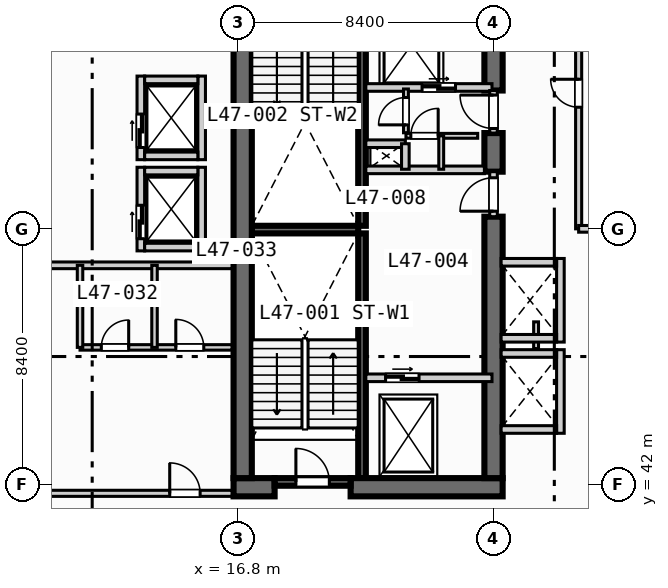
"""IFC4 building model, lengths in metres.
Left out: names, types, materials, properties, quantities, classifications, styles, units other than length and angle.
Written with IfcOpenShell. Run it as: python <this file> out.ifc"""

import sys

from ifc_helpers import new_model, si_unit, direction, frame, frame_2d, origin, place, context, subcontext, project, spatial, rectangle, extrude, element, fill, save


model = new_model("IFC4")
c1 = context("Model", 3, precision=1e-05, world=origin(), true_north=direction((0.0, 1.0)))
c2 = subcontext(c1, "Body", "Model", "MODEL_VIEW")
j1 = project(units=[si_unit("LENGTHUNIT", "METRE"), si_unit("PLANEANGLEUNIT", "RADIAN")], contexts=[c1])
p1 = place(None, origin())
s1 = spatial("IfcSite", under=j1, at=p1, CompositionType="ELEMENT")
p2 = place(p1, origin())
s2 = spatial("IfcBuilding", under=s1, at=p2, CompositionType="ELEMENT")
p3 = place(p2, frame((0.0, 0.0, 193.9)))
s3 = spatial("IfcBuildingStorey", under=s2, at=p3, CompositionType="ELEMENT", Elevation=193.9)
for number, where, z_axis, x_axis in (
    (1, (20.875, 42.2, 0.0), (0.0, 0.0, 1.0), (0.0, 1.0, 0.0)),
    (2, (20.875, 50.5, 0.0), (0.0, 0.0, 1.0), (0.0, 1.0, 0.0)),
):
    element("IfcWall", number, at=place(p3, frame(where, z_axis=z_axis, x_axis=x_axis)), inside=s3, PredefinedType="SOLIDWALL", context=c2, shape_type="SweptSolid", body=[
        extrude(rectangle(XDim=8.05, YDim=0.25, at=frame_2d((4.025, 0.0))), origin(), (0.0, 0.0, 1.0), 3.47),
    ])
p4 = place(p3, frame((17.25, 50.375, 0.0), z_axis=(0.0, 0.0, 1.0), x_axis=(1.0, 0.0, 0.0)))
e3 = element("IfcWall", 3, at=p4, inside=s3, PredefinedType="SOLIDWALL", context=c2, shape_type="SweptSolid", body=[
    extrude(rectangle(XDim=3.5, YDim=0.25, at=frame_2d((1.75, 0.0))), origin(), (0.0, 0.0, 1.0), 3.47),
])
p5 = place(p3, frame((16.65, 41.9, 0.0), z_axis=(0.0, 0.0, 1.0), x_axis=(1.0, 0.0, 0.0)))
e4 = element("IfcWall", 4, at=p5, inside=s3, PredefinedType="SHEAR", context=c2, shape_type="SweptSolid", body=[
    extrude(rectangle(XDim=1.35, YDim=0.6, at=frame_2d((0.675, 0.0))), origin(), (0.0, 0.0, 1.0), 3.47),
])
p6 = place(p3, frame((20.5, 41.9, 0.0), z_axis=(0.0, 0.0, 1.0), x_axis=(1.0, 0.0, 0.0)))
e5 = element("IfcWall", 5, at=p6, inside=s3, PredefinedType="SHEAR", context=c2, shape_type="SweptSolid", body=[
    extrude(rectangle(XDim=5.0, YDim=0.6, at=frame_2d((2.5, 0.0))), origin(), (0.0, 0.0, 1.0), 3.47),
])
p7 = place(p3, frame((16.95, 42.2, 0.0), z_axis=(0.0, 0.0, 1.0), x_axis=(0.0, 1.0, 0.0)))
e6 = element("IfcWall", 6, at=p7, inside=s3, PredefinedType="SHEAR", context=c2, shape_type="SweptSolid", body=[
    extrude(rectangle(XDim=16.35, YDim=0.6, at=frame_2d((8.175, 0.0))), origin(), (0.0, 0.0, 1.0), 3.47),
])
p8 = place(p3, frame((25.2, 42.2, 0.0), z_axis=(0.0, 0.0, 1.0), x_axis=(0.0, 1.0, 0.0)))
e7 = element("IfcWall", 7, at=p8, inside=s3, PredefinedType="SHEAR", context=c2, shape_type="SweptSolid", body=[
    extrude(rectangle(XDim=8.6, YDim=0.6, at=frame_2d((4.3, 0.0))), origin(), (0.0, 0.0, 1.0), 3.47),
])
p9 = place(p3, frame((25.2, 52.28, 0.0), z_axis=(0.0, 0.0, 1.0), x_axis=(0.0, 1.0, 0.0)))
e8 = element("IfcWall", 8, at=p9, inside=s3, PredefinedType="SHEAR", context=c2, shape_type="SweptSolid", body=[
    extrude(rectangle(XDim=1.27, YDim=0.6, at=frame_2d((0.635, 0.0))), origin(), (0.0, 0.0, 1.0), 3.47),
])
p10 = place(p3, frame((25.2, 54.95, 0.0), z_axis=(0.0, 0.0, 1.0), x_axis=(0.0, 1.0, 0.0)))
e9 = element("IfcWall", 9, at=p10, inside=s3, PredefinedType="SHEAR", context=c2, shape_type="SweptSolid", body=[
    extrude(rectangle(XDim=3.6, YDim=0.6, at=frame_2d((1.8, 0.0))), origin(), (0.0, 0.0, 1.0), 3.47),
])
p11 = place(p3, frame((18.0, 42.075, 0.0), z_axis=(0.0, 0.0, 1.0), x_axis=(1.0, 0.0, 0.0)))
e10 = element("IfcWall", 10, at=p11, inside=s3, PredefinedType="SOLIDWALL", context=c2, shape_type="SweptSolid", body=[
    extrude(rectangle(XDim=2.5, YDim=0.25, at=frame_2d((1.25, 0.0))), origin(), (0.0, 0.0, 1.0), 3.47),
])
p12 = place(p11, frame((0.7, 0.0, 0.0)))
e11 = element("IfcOpeningElement", 11, at=p12, cuts=e10, PredefinedType="OPENING", context=c2, shape_type="SweptSolid", body=[
    extrude(rectangle(XDim=1.1, YDim=2.15, at=frame_2d((0.55, 1.075))), frame((0.0, 0.135, 0.0), z_axis=(0.0, -1.0, 0.0), x_axis=(1.0, 0.0, 0.0)), (0.0, 0.0, 1.0), 0.27),
])
p13 = place(p3, frame((21.0, 45.5, 0.0), z_axis=(0.0, 0.0, 1.0), x_axis=(1.0, 0.0, 0.0)))
e12 = element("IfcWall", 12, at=p13, inside=s3, PredefinedType="SOLIDWALL", context=c2, shape_type="SweptSolid", body=[
    extrude(rectangle(XDim=4.15, YDim=0.25, at=frame_2d((2.075, 0.0))), origin(), (0.0, 0.0, 1.0), 3.47),
])
p14 = place(p13, frame((0.65, 0.0, 0.0)))
e13 = element("IfcOpeningElement", 13, at=p14, cuts=e12, PredefinedType="OPENING", context=c2, shape_type="SweptSolid", body=[
    extrude(rectangle(XDim=1.1, YDim=2.15, at=frame_2d((0.55, 1.075))), frame((0.0, 0.135, 0.0), z_axis=(0.0, -1.0, 0.0), x_axis=(1.0, 0.0, 0.0)), (0.0, 0.0, 1.0), 0.27),
])
p15 = place(p3, frame((25.2, 50.8, 0.0), z_axis=(0.0, 0.0, 1.0), x_axis=(0.0, 1.0, 0.0)))
e14 = element("IfcWall", 14, at=p15, inside=s3, PredefinedType="SOLIDWALL", context=c2, shape_type="SweptSolid", body=[
    extrude(rectangle(XDim=1.48, YDim=0.25, at=frame_2d((0.74, 0.0))), origin(), (0.0, 0.0, 1.0), 3.47),
])
p16 = place(p15, frame((0.18, 0.0, 0.0)))
e15 = element("IfcOpeningElement", 15, at=p16, cuts=e14, PredefinedType="OPENING", context=c2, shape_type="SweptSolid", body=[
    extrude(rectangle(XDim=1.1, YDim=2.15, at=frame_2d((0.55, 1.075))), frame((0.0, 0.135, 0.0), z_axis=(0.0, -1.0, 0.0), x_axis=(1.0, 0.0, 0.0)), (0.0, 0.0, 1.0), 0.27),
])
p17 = place(p3, frame((21.0, 52.34, 0.0), z_axis=(0.0, 0.0, 1.0), x_axis=(1.0, 0.0, 0.0)))
e16 = element("IfcWall", 16, at=p17, inside=s3, PredefinedType="SOLIDWALL", context=c2, shape_type="SweptSolid", body=[
    extrude(rectangle(XDim=3.9, YDim=0.25, at=frame_2d((1.95, 0.0))), origin(), (0.0, 0.0, 1.0), 3.47),
])
p18 = place(p3, frame((21.0, 55.05, 0.0), z_axis=(0.0, 0.0, 1.0), x_axis=(1.0, 0.0, 0.0)))
e17 = element("IfcWall", 17, at=p18, inside=s3, PredefinedType="SOLIDWALL", context=c2, shape_type="SweptSolid", body=[
    extrude(rectangle(XDim=4.15, YDim=0.25, at=frame_2d((2.075, 0.0))), origin(), (0.0, 0.0, 1.0), 3.47),
])
p19 = place(p18, frame((1.85, 0.0, 0.0)))
e18 = element("IfcOpeningElement", 18, at=p19, cuts=e17, PredefinedType="OPENING", context=c2, shape_type="SweptSolid", body=[
    extrude(rectangle(XDim=1.1, YDim=2.15, at=frame_2d((0.55, 1.075))), frame((0.0, 0.135, 0.0), z_axis=(0.0, -1.0, 0.0), x_axis=(1.0, 0.0, 0.0)), (0.0, 0.0, 1.0), 0.27),
])
p20 = place(p3, frame((25.2, 53.55, 0.0), z_axis=(0.0, 0.0, 1.0), x_axis=(0.0, 1.0, 0.0)))
e19 = element("IfcWall", 19, at=p20, inside=s3, PredefinedType="SOLIDWALL", context=c2, shape_type="SweptSolid", body=[
    extrude(rectangle(XDim=1.4, YDim=0.25, at=frame_2d((0.7, 0.0))), origin(), (0.0, 0.0, 1.0), 3.47),
])
p21 = place(p20, frame((0.15, 0.0, 0.0)))
e20 = element("IfcOpeningElement", 20, at=p21, cuts=e19, PredefinedType="OPENING", context=c2, shape_type="SweptSolid", body=[
    extrude(rectangle(XDim=1.1, YDim=2.15, at=frame_2d((0.55, 1.075))), frame((0.0, 0.135, 0.0), z_axis=(0.0, -1.0, 0.0), x_axis=(1.0, 0.0, 0.0)), (0.0, 0.0, 1.0), 0.27),
])
p22 = place(p3, frame((21.0, 53.2, 0.0), z_axis=(0.0, 0.0, 1.0), x_axis=(1.0, 0.0, 0.0)))
e21 = element("IfcWall", 21, at=p22, inside=s3, PredefinedType="SOLIDWALL", context=c2, shape_type="SweptSolid", body=[
    extrude(rectangle(XDim=1.3, YDim=0.25, at=frame_2d((0.65, 0.0))), origin(), (0.0, 0.0, 1.0), 3.47),
])
p23 = place(p3, frame((22.3, 52.36, 0.0), z_axis=(0.0, 0.0, 1.0), x_axis=(0.0, 1.0, 0.0)))
e22 = element("IfcWall", 22, at=p23, inside=s3, PredefinedType="SOLIDWALL", context=c2, shape_type="SweptSolid", body=[
    extrude(rectangle(XDim=0.84, YDim=0.25, at=frame_2d((0.42, 0.0))), origin(), (0.0, 0.0, 1.0), 3.47),
])
p24 = place(p3, frame((22.32, 53.56, 0.0), z_axis=(0.0, 0.0, 1.0), x_axis=(0.0, 1.0, 0.0)))
e23 = element("IfcWall", 23, at=p24, inside=s3, PredefinedType="PARTITIONING", context=c2, shape_type="SweptSolid", body=[
    extrude(rectangle(XDim=1.44, YDim=0.16, at=frame_2d((0.72, 0.0))), origin(), (0.0, 0.0, 1.0), 3.47),
])
p25 = place(p24, frame((0.26, 0.0, 0.0)))
e24 = element("IfcOpeningElement", 24, at=p25, cuts=e23, PredefinedType="OPENING", context=c2, shape_type="SweptSolid", body=[
    extrude(rectangle(XDim=0.9, YDim=2.1, at=frame_2d((0.45, 1.05))), frame((0.0, 0.09, 0.0), z_axis=(0.0, -1.0, 0.0), x_axis=(1.0, 0.0, 0.0)), (0.0, 0.0, 1.0), 0.18),
])
p26 = place(p3, frame((22.32, 53.46, 0.0), z_axis=(0.0, 0.0, 1.0), x_axis=(1.0, 0.0, 0.0)))
e25 = element("IfcWall", 25, at=p26, inside=s3, PredefinedType="PARTITIONING", context=c2, shape_type="SweptSolid", body=[
    extrude(rectangle(XDim=2.36, YDim=0.16, at=frame_2d((1.18, 0.0))), origin(), (0.0, 0.0, 1.0), 3.47),
])
p27 = place(p26, frame((0.16, 0.0, 0.0)))
e26 = element("IfcOpeningElement", 26, at=p27, cuts=e25, PredefinedType="OPENING", context=c2, shape_type="SweptSolid", body=[
    extrude(rectangle(XDim=0.9, YDim=2.1, at=frame_2d((0.45, 1.05))), frame((0.0, 0.09, 0.0), z_axis=(0.0, -1.0, 0.0), x_axis=(1.0, 0.0, 0.0)), (0.0, 0.0, 1.0), 0.18),
])
p28 = place(p3, frame((23.48, 52.36, 0.0), z_axis=(0.0, 0.0, 1.0), x_axis=(0.0, 1.0, 0.0)))
e27 = element("IfcWall", 27, at=p28, inside=s3, PredefinedType="PARTITIONING", context=c2, shape_type="SweptSolid", body=[
    extrude(rectangle(XDim=1.1, YDim=0.16, at=frame_2d((0.55, 0.0))), origin(), (0.0, 0.0, 1.0), 3.47),
])
p29 = place(p3, frame((13.6, 49.675, 0.0), z_axis=(0.0, 0.0, 1.0), x_axis=(0.0, 1.0, 0.0)))
e28 = element("IfcWall", 28, at=p29, inside=s3, PredefinedType="SOLIDWALL", context=c2, shape_type="SweptSolid", body=[
    extrude(rectangle(XDim=2.75, YDim=0.25, at=frame_2d((1.375, 0.0))), origin(), (0.0, 0.0, 1.0), 3.47),
])
p30 = place(p29, frame((0.4, 0.0, 0.0)))
e29 = element("IfcOpeningElement", 29, at=p30, cuts=e28, PredefinedType="OPENING", context=c2, shape_type="SweptSolid", body=[
    extrude(rectangle(XDim=1.1, YDim=2.15, at=frame_2d((0.55, 1.075))), frame((0.0, 0.135, 0.0), z_axis=(0.0, -1.0, 0.0), x_axis=(1.0, 0.0, 0.0)), (0.0, 0.0, 1.0), 0.27),
])
p31 = place(p3, frame((15.6, 49.675, 0.0), z_axis=(0.0, 0.0, 1.0), x_axis=(0.0, 1.0, 0.0)))
e30 = element("IfcWall", 30, at=p31, inside=s3, PredefinedType="SOLIDWALL", context=c2, shape_type="SweptSolid", body=[
    extrude(rectangle(XDim=2.75, YDim=0.25, at=frame_2d((1.375, 0.0))), origin(), (0.0, 0.0, 1.0), 3.47),
])
for number, where, z_axis, x_axis in (
    (31, (13.725, 49.8, 0.0), (0.0, 0.0, 1.0), (1.0, 0.0, 0.0)),
    (32, (13.725, 52.3, 0.0), (0.0, 0.0, 1.0), (1.0, 0.0, 0.0)),
):
    element("IfcWall", number, at=place(p3, frame(where, z_axis=z_axis, x_axis=x_axis)), inside=s3, PredefinedType="SOLIDWALL", context=c2, shape_type="SweptSolid", body=[
        extrude(rectangle(XDim=1.75, YDim=0.25, at=frame_2d((0.875, 0.0))), origin(), (0.0, 0.0, 1.0), 3.47),
    ])
p32 = place(p3, frame((13.6, 52.675, 0.0), z_axis=(0.0, 0.0, 1.0), x_axis=(0.0, 1.0, 0.0)))
e33 = element("IfcWall", 33, at=p32, inside=s3, PredefinedType="SOLIDWALL", context=c2, shape_type="SweptSolid", body=[
    extrude(rectangle(XDim=2.75, YDim=0.25, at=frame_2d((1.375, 0.0))), origin(), (0.0, 0.0, 1.0), 3.47),
])
p33 = place(p32, frame((0.4, 0.0, 0.0)))
e34 = element("IfcOpeningElement", 34, at=p33, cuts=e33, PredefinedType="OPENING", context=c2, shape_type="SweptSolid", body=[
    extrude(rectangle(XDim=1.1, YDim=2.15, at=frame_2d((0.55, 1.075))), frame((0.0, 0.135, 0.0), z_axis=(0.0, -1.0, 0.0), x_axis=(1.0, 0.0, 0.0)), (0.0, 0.0, 1.0), 0.27),
])
p34 = place(p3, frame((15.6, 52.675, 0.0), z_axis=(0.0, 0.0, 1.0), x_axis=(0.0, 1.0, 0.0)))
e35 = element("IfcWall", 35, at=p34, inside=s3, PredefinedType="SOLIDWALL", context=c2, shape_type="SweptSolid", body=[
    extrude(rectangle(XDim=2.75, YDim=0.25, at=frame_2d((1.375, 0.0))), origin(), (0.0, 0.0, 1.0), 3.47),
])
for number, where, z_axis, x_axis in (
    (36, (13.725, 52.8, 0.0), (0.0, 0.0, 1.0), (1.0, 0.0, 0.0)),
    (37, (13.725, 55.3, 0.0), (0.0, 0.0, 1.0), (1.0, 0.0, 0.0)),
):
    element("IfcWall", number, at=place(p3, frame(where, z_axis=z_axis, x_axis=x_axis)), inside=s3, PredefinedType="SOLIDWALL", context=c2, shape_type="SweptSolid", body=[
        extrude(rectangle(XDim=1.75, YDim=0.25, at=frame_2d((0.875, 0.0))), origin(), (0.0, 0.0, 1.0), 3.47),
    ])
p35 = place(p3, frame((27.4, 43.675, 0.0), z_axis=(0.0, 0.0, 1.0), x_axis=(0.0, 1.0, 0.0)))
e38 = element("IfcWall", 38, at=p35, inside=s3, PredefinedType="SOLIDWALL", context=c2, shape_type="SweptSolid", body=[
    extrude(rectangle(XDim=2.75, YDim=0.25, at=frame_2d((1.375, 0.0))), origin(), (0.0, 0.0, 1.0), 3.47),
])
for number, where, z_axis, x_axis in (
    (39, (25.45, 43.8, 0.0), (0.0, 0.0, 1.0), (1.0, 0.0, 0.0)),
    (40, (25.45, 46.3, 0.0), (0.0, 0.0, 1.0), (1.0, 0.0, 0.0)),
):
    element("IfcWall", number, at=place(p3, frame(where, z_axis=z_axis, x_axis=x_axis)), inside=s3, PredefinedType="SOLIDWALL", context=c2, shape_type="SweptSolid", body=[
        extrude(rectangle(XDim=1.825, YDim=0.25, at=frame_2d((0.913, 0.0))), origin(), (0.0, 0.0, 1.0), 3.47),
    ])
p36 = place(p3, frame((26.6, 46.46, 0.0), z_axis=(0.0, 0.0, 1.0), x_axis=(0.0, 1.0, 0.0)))
e41 = element("IfcWall", 41, at=p36, inside=s3, PredefinedType="PARTITIONING", context=c2, shape_type="SweptSolid", body=[
    extrude(rectangle(XDim=0.88, YDim=0.16, at=frame_2d((0.44, 0.0))), origin(), (0.0, 0.0, 1.0), 3.47),
])
p37 = place(p3, frame((27.4, 46.675, 0.0), z_axis=(0.0, 0.0, 1.0), x_axis=(0.0, 1.0, 0.0)))
e42 = element("IfcWall", 42, at=p37, inside=s3, PredefinedType="SOLIDWALL", context=c2, shape_type="SweptSolid", body=[
    extrude(rectangle(XDim=2.75, YDim=0.25, at=frame_2d((1.375, 0.0))), origin(), (0.0, 0.0, 1.0), 3.47),
])
for number, where, z_axis, x_axis in (
    (43, (25.45, 46.8, 0.0), (0.0, 0.0, 1.0), (1.0, 0.0, 0.0)),
    (44, (25.45, 49.3, 0.0), (0.0, 0.0, 1.0), (1.0, 0.0, 0.0)),
):
    element("IfcWall", number, at=place(p3, frame(where, z_axis=z_axis, x_axis=x_axis)), inside=s3, PredefinedType="SOLIDWALL", context=c2, shape_type="SweptSolid", body=[
        extrude(rectangle(XDim=1.825, YDim=0.25, at=frame_2d((0.913, 0.0))), origin(), (0.0, 0.0, 1.0), 3.47),
    ])
p38 = place(p3, frame((0.35, 41.7, 0.0), z_axis=(0.0, 0.0, 1.0), x_axis=(1.0, 0.0, 0.0)))
e45 = element("IfcWall", 45, at=p38, inside=s3, PredefinedType="PARTITIONING", context=c2, shape_type="SweptSolid", body=[
    extrude(rectangle(XDim=16.25, YDim=0.2, at=frame_2d((8.125, 0.0))), origin(), (0.0, 0.0, 1.0), 2.82),
])
p39 = place(p38, frame((14.2, 0.0, 0.0)))
e46 = element("IfcOpeningElement", 46, at=p39, cuts=e45, PredefinedType="OPENING", context=c2, shape_type="SweptSolid", body=[
    extrude(rectangle(XDim=1.0, YDim=2.15, at=frame_2d((0.5, 1.075))), frame((0.0, 0.11, 0.0), z_axis=(0.0, -1.0, 0.0), x_axis=(1.0, 0.0, 0.0)), (0.0, 0.0, 1.0), 0.22),
])
p40 = place(p3, frame((0.35, 49.2, 0.0), z_axis=(0.0, 0.0, 1.0), x_axis=(1.0, 0.0, 0.0)))
e47 = element("IfcWall", 47, at=p40, inside=s3, PredefinedType="PARTITIONING", context=c2, shape_type="SweptSolid", body=[
    extrude(rectangle(XDim=16.25, YDim=0.22, at=frame_2d((8.125, 0.0))), origin(), (0.0, 0.0, 1.0), 3.47),
])
p41 = place(p3, frame((11.6, 46.5, 0.0), z_axis=(0.0, 0.0, 1.0), x_axis=(1.0, 0.0, 0.0)))
e48 = element("IfcWall", 48, at=p41, inside=s3, PredefinedType="PLUMBINGWALL", context=c2, shape_type="SweptSolid", body=[
    extrude(rectangle(XDim=5.0, YDim=0.18, at=frame_2d((2.5, 0.0))), origin(), (0.0, 0.0, 1.0), 3.47),
])
p42 = place(p41, frame((0.7, 0.0, 0.0)))
e49 = element("IfcOpeningElement", 49, at=p42, cuts=e48, PredefinedType="OPENING", context=c2, shape_type="SweptSolid", body=[
    extrude(rectangle(XDim=0.9, YDim=2.1, at=frame_2d((0.45, 1.05))), frame((0.0, 0.1, 0.0), z_axis=(0.0, -1.0, 0.0), x_axis=(1.0, 0.0, 0.0)), (0.0, 0.0, 1.0), 0.2),
])
p43 = place(p41, frame((3.15, 0.0, 0.0)))
e50 = element("IfcOpeningElement", 50, at=p43, cuts=e48, PredefinedType="OPENING", context=c2, shape_type="SweptSolid", body=[
    extrude(rectangle(XDim=0.92, YDim=2.1, at=frame_2d((0.46, 1.05))), frame((0.0, 0.1, 0.0), z_axis=(0.0, -1.0, 0.0), x_axis=(1.0, 0.0, 0.0)), (0.0, 0.0, 1.0), 0.2),
])
for number, where, z_axis, x_axis in (
    (51, (11.6, 46.5, 0.0), (0.0, 0.0, 1.0), (0.0, 1.0, 0.0)),
    (52, (14.05, 46.5, 0.0), (0.0, 0.0, 1.0), (0.0, 1.0, 0.0)),
):
    element("IfcWall", number, at=place(p3, frame(where, z_axis=z_axis, x_axis=x_axis)), inside=s3, PredefinedType="PLUMBINGWALL", context=c2, shape_type="SweptSolid", body=[
        extrude(rectangle(XDim=2.7, YDim=0.18, at=frame_2d((1.35, 0.0))), origin(), (0.0, 0.0, 1.0), 3.47),
    ])
p44 = place(p3, frame((28.0, 50.4, 0.0), z_axis=(0.0, 0.0, 1.0), x_axis=(0.0, 1.0, 0.0)))
e53 = element("IfcWall", 53, at=p44, inside=s3, PredefinedType="PARTITIONING", context=c2, shape_type="SweptSolid", body=[
    extrude(rectangle(XDim=21.8, YDim=0.2, at=frame_2d((10.9, 0.0))), origin(), (0.0, 0.0, 1.0), 3.47),
])
p45 = place(p44, frame((4.0, 0.0, 0.0)))
e54 = element("IfcOpeningElement", 54, at=p45, cuts=e53, PredefinedType="OPENING", context=c2, shape_type="SweptSolid", body=[
    extrude(rectangle(XDim=0.92, YDim=2.1, at=frame_2d((0.46, 1.05))), frame((0.0, 0.11, 0.0), z_axis=(0.0, -1.0, 0.0), x_axis=(1.0, 0.0, 0.0)), (0.0, 0.0, 1.0), 0.22),
])
p46 = place(p3, frame((28.0, 50.4, 0.0), z_axis=(0.0, 0.0, 1.0), x_axis=(1.0, 0.0, 0.0)))
e55 = element("IfcWall", 55, at=p46, inside=s3, PredefinedType="PARTITIONING", context=c2, shape_type="SweptSolid", body=[
    extrude(rectangle(XDim=5.3, YDim=0.22, at=frame_2d((2.65, 0.0))), origin(), (0.0, 0.0, 1.0), 2.82),
])
p47 = place(p12, origin())
e56 = element("IfcDoor", 56, at=p47, inside=s3, OperationType="SINGLE_SWING_LEFT", PredefinedType="DOOR", context=c2, shape_type="SweptSolid", body=[
    extrude(rectangle(XDim=1.1, YDim=2.15, at=frame_2d((0.55, 1.075))), frame((0.0, 0.025, 0.0), z_axis=(0.0, -1.0, 0.0), x_axis=(1.0, 0.0, 0.0)), (0.0, 0.0, 1.0), 0.05),
])
fill(e11, e56)
p48 = place(p14, origin())
e57 = element("IfcDoor", 57, at=p48, inside=s3, OperationType="SLIDING_TO_LEFT", PredefinedType="DOOR", context=c2, shape_type="SweptSolid", body=[
    extrude(rectangle(XDim=1.1, YDim=2.15, at=frame_2d((0.55, 1.075))), frame((0.0, 0.025, 0.0), z_axis=(0.0, -1.0, 0.0), x_axis=(1.0, 0.0, 0.0)), (0.0, 0.0, 1.0), 0.05),
])
fill(e13, e57)
p49 = place(p16, origin())
e58 = element("IfcDoor", 58, at=p49, inside=s3, OperationType="SINGLE_SWING_LEFT", PredefinedType="DOOR", context=c2, shape_type="SweptSolid", body=[
    extrude(rectangle(XDim=1.1, YDim=2.15, at=frame_2d((0.55, 1.075))), frame((0.0, 0.025, 0.0), z_axis=(0.0, -1.0, 0.0), x_axis=(1.0, 0.0, 0.0)), (0.0, 0.0, 1.0), 0.05),
])
fill(e15, e58)
p50 = place(p19, origin())
e59 = element("IfcDoor", 59, at=p50, inside=s3, OperationType="SLIDING_TO_LEFT", PredefinedType="DOOR", context=c2, shape_type="SweptSolid", body=[
    extrude(rectangle(XDim=1.1, YDim=2.15, at=frame_2d((0.55, 1.075))), frame((0.0, 0.025, 0.0), z_axis=(0.0, -1.0, 0.0), x_axis=(1.0, 0.0, 0.0)), (0.0, 0.0, 1.0), 0.05),
])
fill(e18, e59)
p51 = place(p21, origin())
e60 = element("IfcDoor", 60, at=p51, inside=s3, OperationType="SINGLE_SWING_RIGHT", PredefinedType="DOOR", context=c2, shape_type="SweptSolid", body=[
    extrude(rectangle(XDim=1.1, YDim=2.15, at=frame_2d((0.55, 1.075))), frame((0.0, 0.025, 0.0), z_axis=(0.0, -1.0, 0.0), x_axis=(1.0, 0.0, 0.0)), (0.0, 0.0, 1.0), 0.05),
])
fill(e20, e60)
p52 = place(p25, origin())
e61 = element("IfcDoor", 61, at=p52, inside=s3, OperationType="SINGLE_SWING_LEFT", PredefinedType="DOOR", context=c2, shape_type="SweptSolid", body=[
    extrude(rectangle(XDim=0.9, YDim=2.1, at=frame_2d((0.45, 1.05))), frame((0.0, 0.025, 0.0), z_axis=(0.0, -1.0, 0.0), x_axis=(1.0, 0.0, 0.0)), (0.0, 0.0, 1.0), 0.05),
])
fill(e24, e61)
p53 = place(p27, origin())
e62 = element("IfcDoor", 62, at=p53, inside=s3, OperationType="SINGLE_SWING_RIGHT", PredefinedType="DOOR", context=c2, shape_type="SweptSolid", body=[
    extrude(rectangle(XDim=0.9, YDim=2.1, at=frame_2d((0.45, 1.05))), frame((0.0, 0.025, 0.0), z_axis=(0.0, -1.0, 0.0), x_axis=(1.0, 0.0, 0.0)), (0.0, 0.0, 1.0), 0.05),
])
fill(e26, e62)
p54 = place(p30, origin())
e63 = element("IfcDoor", 63, at=p54, inside=s3, OperationType="SLIDING_TO_LEFT", PredefinedType="DOOR", context=c2, shape_type="SweptSolid", body=[
    extrude(rectangle(XDim=1.1, YDim=2.15, at=frame_2d((0.55, 1.075))), frame((0.0, 0.025, 0.0), z_axis=(0.0, -1.0, 0.0), x_axis=(1.0, 0.0, 0.0)), (0.0, 0.0, 1.0), 0.05),
])
fill(e29, e63)
p55 = place(p33, origin())
e64 = element("IfcDoor", 64, at=p55, inside=s3, OperationType="SLIDING_TO_LEFT", PredefinedType="DOOR", context=c2, shape_type="SweptSolid", body=[
    extrude(rectangle(XDim=1.1, YDim=2.15, at=frame_2d((0.55, 1.075))), frame((0.0, 0.025, 0.0), z_axis=(0.0, -1.0, 0.0), x_axis=(1.0, 0.0, 0.0)), (0.0, 0.0, 1.0), 0.05),
])
fill(e34, e64)
p56 = place(p39, origin())
e65 = element("IfcDoor", 65, at=p56, inside=s3, OperationType="SINGLE_SWING_LEFT", PredefinedType="DOOR", context=c2, shape_type="SweptSolid", body=[
    extrude(rectangle(XDim=1.0, YDim=2.15, at=frame_2d((0.5, 1.075))), frame((0.0, 0.025, 0.0), z_axis=(0.0, -1.0, 0.0), x_axis=(1.0, 0.0, 0.0)), (0.0, 0.0, 1.0), 0.05),
])
fill(e46, e65)
p57 = place(p42, origin())
e66 = element("IfcDoor", 66, at=p57, inside=s3, OperationType="SINGLE_SWING_RIGHT", PredefinedType="DOOR", context=c2, shape_type="SweptSolid", body=[
    extrude(rectangle(XDim=0.9, YDim=2.1, at=frame_2d((0.45, 1.05))), frame((0.0, 0.025, 0.0), z_axis=(0.0, -1.0, 0.0), x_axis=(1.0, 0.0, 0.0)), (0.0, 0.0, 1.0), 0.05),
])
fill(e49, e66)
p58 = place(p43, origin())
e67 = element("IfcDoor", 67, at=p58, inside=s3, OperationType="SINGLE_SWING_LEFT", PredefinedType="DOOR", context=c2, shape_type="SweptSolid", body=[
    extrude(rectangle(XDim=0.92, YDim=2.1, at=frame_2d((0.46, 1.05))), frame((0.0, 0.025, 0.0), z_axis=(0.0, -1.0, 0.0), x_axis=(1.0, 0.0, 0.0)), (0.0, 0.0, 1.0), 0.05),
])
fill(e50, e67)
p59 = place(p45, origin())
e68 = element("IfcDoor", 68, at=p59, inside=s3, OperationType="SINGLE_SWING_RIGHT", PredefinedType="DOOR", context=c2, shape_type="SweptSolid", body=[
    extrude(rectangle(XDim=0.92, YDim=2.1, at=frame_2d((0.46, 1.05))), frame((0.0, 0.025, 0.0), z_axis=(0.0, -1.0, 0.0), x_axis=(1.0, 0.0, 0.0)), (0.0, 0.0, 1.0), 0.05),
])
fill(e54, e68)
save(model, sys.argv[1])
